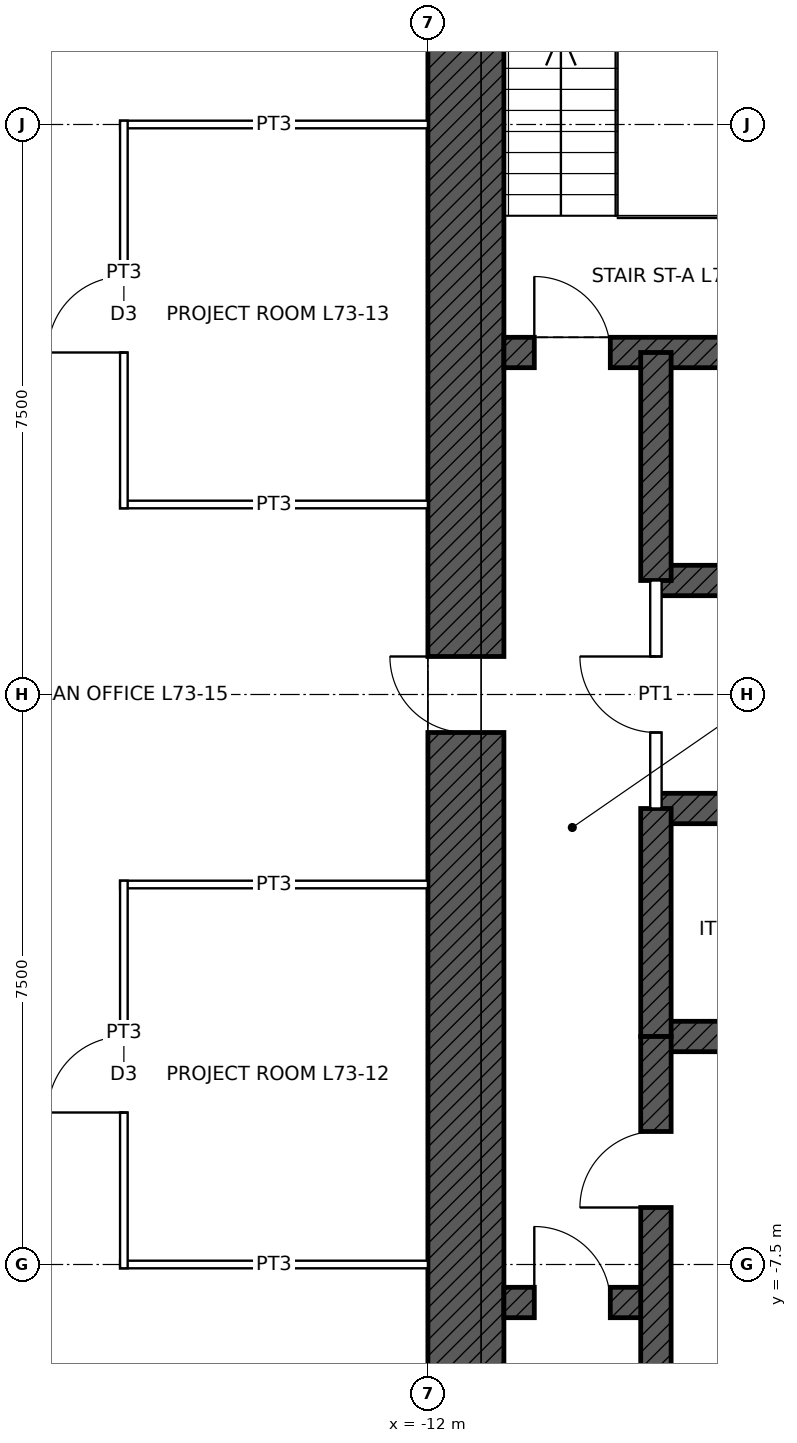
"""IFC4 building model, lengths in metres.
Left out: names, types, materials, properties, quantities, classifications, styles, units other than length and angle.
Written with IfcOpenShell. Run it as: python <this file> out.ifc"""

import sys

from ifc_helpers import new_model, si_unit, direction, frame, frame_2d, origin, place, context, subcontext, project, spatial, rectangle, extrude, element, fill, save


model = new_model("IFC4")
c1 = context("Model", 3, precision=1e-05, world=origin(), true_north=direction((0.0, 1.0)))
c2 = subcontext(c1, "Body", "Model", "MODEL_VIEW")
j1 = project(units=[si_unit("LENGTHUNIT", "METRE"), si_unit("PLANEANGLEUNIT", "RADIAN")], contexts=[c1])
p1 = place(None, origin())
s1 = spatial("IfcSite", under=j1, at=p1, CompositionType="ELEMENT")
p2 = place(p1, origin())
s2 = spatial("IfcBuilding", under=s1, at=p2, CompositionType="ELEMENT")
p3 = place(p2, frame((0.0, 0.0, 327.9)))
s3 = spatial("IfcBuildingStorey", under=s2, at=p3, CompositionType="ELEMENT", Elevation=327.9)
p4 = place(p3, frame((-11.5, -11.0, 0.0), z_axis=(0.0, 0.0, 1.0), x_axis=(0.0, 1.0, 0.0)))
e1 = element("IfcWall", 1, at=p4, inside=s3, PredefinedType="SHEAR", context=c2, shape_type="SweptSolid", body=[
    extrude(rectangle(XDim=22.0, YDim=1.0, at=frame_2d((11.0, 0.0))), origin(), (0.0, 0.0, 1.0), 4.0),
])
p5 = place(p4, frame((10.5, 0.0, 0.0)))
e2 = element("IfcOpeningElement", 2, at=p5, cuts=e1, PredefinedType="OPENING", context=c2, shape_type="SweptSolid", body=[
    extrude(rectangle(XDim=1.0, YDim=2.4, at=frame_2d((0.5, 1.2))), frame((0.0, 0.51, 0.0), z_axis=(0.0, -1.0, 0.0), x_axis=(1.0, 0.0, 0.0)), (0.0, 0.0, 1.0), 1.02),
])
p6 = place(p3, frame((-11.0, 4.5, 0.0), z_axis=(0.0, 0.0, 1.0), x_axis=(1.0, 0.0, 0.0)))
e3 = element("IfcWall", 3, at=p6, inside=s3, PredefinedType="SHEAR", context=c2, shape_type="SweptSolid", body=[
    extrude(rectangle(XDim=22.0, YDim=0.4, at=frame_2d((11.0, 0.0))), origin(), (0.0, 0.0, 1.0), 4.0),
])
p7 = place(p6, frame((0.4, 0.0, 0.0)))
e4 = element("IfcOpeningElement", 4, at=p7, cuts=e3, PredefinedType="OPENING", context=c2, shape_type="SweptSolid", body=[
    extrude(rectangle(XDim=1.0, YDim=2.1, at=frame_2d((0.5, 1.05))), frame((0.0, 0.21, 0.0), z_axis=(0.0, -1.0, 0.0), x_axis=(1.0, 0.0, 0.0)), (0.0, 0.0, 1.0), 0.42),
])
p8 = place(p6, frame((20.6, 0.0, 0.0)))
e5 = element("IfcOpeningElement", 5, at=p8, cuts=e3, PredefinedType="OPENING", context=c2, shape_type="SweptSolid", body=[
    extrude(rectangle(XDim=1.0, YDim=2.1, at=frame_2d((0.5, 1.05))), frame((0.0, 0.21, 0.0), z_axis=(0.0, -1.0, 0.0), x_axis=(1.0, 0.0, 0.0)), (0.0, 0.0, 1.0), 0.42),
])
p9 = place(p3, frame((-9.0, 1.5, 0.0), z_axis=(0.0, 0.0, 1.0), x_axis=(1.0, 0.0, 0.0)))
e6 = element("IfcWall", 6, at=p9, inside=s3, PredefinedType="SHEAR", context=c2, shape_type="SweptSolid", body=[
    extrude(rectangle(XDim=18.0, YDim=0.4, at=frame_2d((9.0, 0.0))), origin(), (0.0, 0.0, 1.0), 4.0),
])
p10 = place(p9, frame((0.95, 0.0, 0.0)))
e7 = element("IfcOpeningElement", 7, at=p10, cuts=e6, PredefinedType="OPENING", context=c2, shape_type="SweptSolid", body=[
    extrude(rectangle(XDim=1.1, YDim=2.1, at=frame_2d((0.55, 1.05))), frame((0.0, 0.21, 0.0), z_axis=(0.0, -1.0, 0.0), x_axis=(1.0, 0.0, 0.0)), (0.0, 0.0, 1.0), 0.42),
])
p11 = place(p9, frame((3.95, 0.0, 0.0)))
e8 = element("IfcOpeningElement", 8, at=p11, cuts=e6, PredefinedType="OPENING", context=c2, shape_type="SweptSolid", body=[
    extrude(rectangle(XDim=1.1, YDim=2.1, at=frame_2d((0.55, 1.05))), frame((0.0, 0.21, 0.0), z_axis=(0.0, -1.0, 0.0), x_axis=(1.0, 0.0, 0.0)), (0.0, 0.0, 1.0), 0.42),
])
p12 = place(p9, frame((6.95, 0.0, 0.0)))
e9 = element("IfcOpeningElement", 9, at=p12, cuts=e6, PredefinedType="OPENING", context=c2, shape_type="SweptSolid", body=[
    extrude(rectangle(XDim=1.1, YDim=2.1, at=frame_2d((0.55, 1.05))), frame((0.0, 0.21, 0.0), z_axis=(0.0, -1.0, 0.0), x_axis=(1.0, 0.0, 0.0)), (0.0, 0.0, 1.0), 0.42),
])
p13 = place(p9, frame((9.95, 0.0, 0.0)))
e10 = element("IfcOpeningElement", 10, at=p13, cuts=e6, PredefinedType="OPENING", context=c2, shape_type="SweptSolid", body=[
    extrude(rectangle(XDim=1.1, YDim=2.1, at=frame_2d((0.55, 1.05))), frame((0.0, 0.21, 0.0), z_axis=(0.0, -1.0, 0.0), x_axis=(1.0, 0.0, 0.0)), (0.0, 0.0, 1.0), 0.42),
])
p14 = place(p9, frame((12.95, 0.0, 0.0)))
e11 = element("IfcOpeningElement", 11, at=p14, cuts=e6, PredefinedType="OPENING", context=c2, shape_type="SweptSolid", body=[
    extrude(rectangle(XDim=1.1, YDim=2.1, at=frame_2d((0.55, 1.05))), frame((0.0, 0.21, 0.0), z_axis=(0.0, -1.0, 0.0), x_axis=(1.0, 0.0, 0.0)), (0.0, 0.0, 1.0), 0.42),
])
p15 = place(p9, frame((15.95, 0.0, 0.0)))
e12 = element("IfcOpeningElement", 12, at=p15, cuts=e6, PredefinedType="OPENING", context=c2, shape_type="SweptSolid", body=[
    extrude(rectangle(XDim=1.1, YDim=2.1, at=frame_2d((0.55, 1.05))), frame((0.0, 0.21, 0.0), z_axis=(0.0, -1.0, 0.0), x_axis=(1.0, 0.0, 0.0)), (0.0, 0.0, 1.0), 0.42),
])
p16 = place(p3, frame((-9.0, -1.5, 0.0), z_axis=(0.0, 0.0, 1.0), x_axis=(1.0, 0.0, 0.0)))
e13 = element("IfcWall", 13, at=p16, inside=s3, PredefinedType="SHEAR", context=c2, shape_type="SweptSolid", body=[
    extrude(rectangle(XDim=18.0, YDim=0.4, at=frame_2d((9.0, 0.0))), origin(), (0.0, 0.0, 1.0), 4.0),
])
p17 = place(p16, frame((9.95, 0.0, 0.0)))
e14 = element("IfcOpeningElement", 14, at=p17, cuts=e13, PredefinedType="OPENING", context=c2, shape_type="SweptSolid", body=[
    extrude(rectangle(XDim=1.1, YDim=2.1, at=frame_2d((0.55, 1.05))), frame((0.0, 0.21, 0.0), z_axis=(0.0, -1.0, 0.0), x_axis=(1.0, 0.0, 0.0)), (0.0, 0.0, 1.0), 0.42),
])
p18 = place(p16, frame((12.95, 0.0, 0.0)))
e15 = element("IfcOpeningElement", 15, at=p18, cuts=e13, PredefinedType="OPENING", context=c2, shape_type="SweptSolid", body=[
    extrude(rectangle(XDim=1.1, YDim=2.1, at=frame_2d((0.55, 1.05))), frame((0.0, 0.21, 0.0), z_axis=(0.0, -1.0, 0.0), x_axis=(1.0, 0.0, 0.0)), (0.0, 0.0, 1.0), 0.42),
])
p19 = place(p16, frame((15.95, 0.0, 0.0)))
e16 = element("IfcOpeningElement", 16, at=p19, cuts=e13, PredefinedType="OPENING", context=c2, shape_type="SweptSolid", body=[
    extrude(rectangle(XDim=1.1, YDim=2.1, at=frame_2d((0.55, 1.05))), frame((0.0, 0.21, 0.0), z_axis=(0.0, -1.0, 0.0), x_axis=(1.0, 0.0, 0.0)), (0.0, 0.0, 1.0), 0.42),
])
p20 = place(p16, frame((0.95, 0.0, 0.0)))
e17 = element("IfcOpeningElement", 17, at=p20, cuts=e13, PredefinedType="OPENING", context=c2, shape_type="SweptSolid", body=[
    extrude(rectangle(XDim=1.1, YDim=2.1, at=frame_2d((0.55, 1.05))), frame((0.0, 0.21, 0.0), z_axis=(0.0, -1.0, 0.0), x_axis=(1.0, 0.0, 0.0)), (0.0, 0.0, 1.0), 0.42),
])
p21 = place(p16, frame((3.95, 0.0, 0.0)))
e18 = element("IfcOpeningElement", 18, at=p21, cuts=e13, PredefinedType="OPENING", context=c2, shape_type="SweptSolid", body=[
    extrude(rectangle(XDim=1.1, YDim=2.1, at=frame_2d((0.55, 1.05))), frame((0.0, 0.21, 0.0), z_axis=(0.0, -1.0, 0.0), x_axis=(1.0, 0.0, 0.0)), (0.0, 0.0, 1.0), 0.42),
])
p22 = place(p16, frame((6.95, 0.0, 0.0)))
e19 = element("IfcOpeningElement", 19, at=p22, cuts=e13, PredefinedType="OPENING", context=c2, shape_type="SweptSolid", body=[
    extrude(rectangle(XDim=1.1, YDim=2.1, at=frame_2d((0.55, 1.05))), frame((0.0, 0.21, 0.0), z_axis=(0.0, -1.0, 0.0), x_axis=(1.0, 0.0, 0.0)), (0.0, 0.0, 1.0), 0.42),
])
p23 = place(p3, frame((-9.0, -4.5, 0.0), z_axis=(0.0, 0.0, 1.0), x_axis=(1.0, 0.0, 0.0)))
e20 = element("IfcWall", 20, at=p23, inside=s3, PredefinedType="SHEAR", context=c2, shape_type="SweptSolid", body=[
    extrude(rectangle(XDim=18.0, YDim=0.4, at=frame_2d((9.0, 0.0))), origin(), (0.0, 0.0, 1.0), 4.0),
])
p24 = place(p3, frame((-11.0, -8.0, 0.0), z_axis=(0.0, 0.0, 1.0), x_axis=(1.0, 0.0, 0.0)))
e21 = element("IfcWall", 21, at=p24, inside=s3, PredefinedType="SHEAR", context=c2, shape_type="SweptSolid", body=[
    extrude(rectangle(XDim=2.0, YDim=0.4, at=frame_2d((1.0, 0.0))), origin(), (0.0, 0.0, 1.0), 4.0),
])
p25 = place(p24, frame((0.4, 0.0, 0.0)))
e22 = element("IfcOpeningElement", 22, at=p25, cuts=e21, PredefinedType="OPENING", context=c2, shape_type="SweptSolid", body=[
    extrude(rectangle(XDim=1.0, YDim=2.1, at=frame_2d((0.5, 1.05))), frame((0.0, 0.21, 0.0), z_axis=(0.0, -1.0, 0.0), x_axis=(1.0, 0.0, 0.0)), (0.0, 0.0, 1.0), 0.42),
])
for number, where, z_axis, x_axis in (
    (23, (-9.0, 1.5, 0.0), (0.0, 0.0, 1.0), (0.0, 1.0, 0.0)),
    (24, (-9.0, -4.5, 0.0), (0.0, 0.0, 1.0), (0.0, 1.0, 0.0)),
):
    element("IfcWall", number, at=place(p3, frame(where, z_axis=z_axis, x_axis=x_axis)), inside=s3, PredefinedType="SHEAR", context=c2, shape_type="SweptSolid", body=[
        extrude(rectangle(XDim=3.0, YDim=0.4, at=frame_2d((1.5, 0.0))), origin(), (0.0, 0.0, 1.0), 4.0),
    ])
p26 = place(p3, frame((-9.0, -11.0, 0.0), z_axis=(0.0, 0.0, 1.0), x_axis=(0.0, 1.0, 0.0)))
e25 = element("IfcWall", 25, at=p26, inside=s3, PredefinedType="SHEAR", context=c2, shape_type="SweptSolid", body=[
    extrude(rectangle(XDim=6.5, YDim=0.4, at=frame_2d((3.25, 0.0))), origin(), (0.0, 0.0, 1.0), 4.0),
])
p27 = place(p26, frame((4.25, 0.0, 0.0)))
e26 = element("IfcOpeningElement", 26, at=p27, cuts=e25, PredefinedType="OPENING", context=c2, shape_type="SweptSolid", body=[
    extrude(rectangle(XDim=1.0, YDim=2.1, at=frame_2d((0.5, 1.05))), frame((0.0, 0.21, 0.0), z_axis=(0.0, -1.0, 0.0), x_axis=(1.0, 0.0, 0.0)), (0.0, 0.0, 1.0), 0.42),
])
p28 = place(p3, frame((-16.05, -7.5, 0.0), z_axis=(0.0, 0.0, 1.0), x_axis=(1.0, 0.0, 0.0)))
e27 = element("IfcWall", 27, at=p28, inside=s3, PredefinedType="PARTITIONING", context=c2, shape_type="SweptSolid", body=[
    extrude(rectangle(XDim=4.05, YDim=0.1, at=frame_2d((2.025, 0.0))), origin(), (0.0, 0.0, 1.0), 3.243),
])
for number, where, z_axis, x_axis in (
    (28, (-16.05, -2.5, 0.0), (0.0, 0.0, 1.0), (1.0, 0.0, 0.0)),
    (29, (-16.05, 2.5, 0.0), (0.0, 0.0, 1.0), (1.0, 0.0, 0.0)),
):
    element("IfcWall", number, at=place(p3, frame(where, z_axis=z_axis, x_axis=x_axis)), inside=s3, PredefinedType="PARTITIONING", context=c2, shape_type="SweptSolid", body=[
        extrude(rectangle(XDim=4.05, YDim=0.1, at=frame_2d((2.025, 0.0))), origin(), (0.0, 0.0, 1.0), 3.85),
    ])
p29 = place(p3, frame((-16.05, 7.5, 0.0), z_axis=(0.0, 0.0, 1.0), x_axis=(1.0, 0.0, 0.0)))
e30 = element("IfcWall", 30, at=p29, inside=s3, PredefinedType="PARTITIONING", context=c2, shape_type="SweptSolid", body=[
    extrude(rectangle(XDim=4.05, YDim=0.1, at=frame_2d((2.025, 0.0))), origin(), (0.0, 0.0, 1.0), 3.243),
])
p30 = place(p3, frame((-16.0, -7.55, 0.0), z_axis=(0.0, 0.0, 1.0), x_axis=(0.0, 1.0, 0.0)))
e31 = element("IfcWall", 31, at=p30, inside=s3, PredefinedType="PARTITIONING", context=c2, shape_type="SweptSolid", body=[
    extrude(rectangle(XDim=5.1, YDim=0.1, at=frame_2d((2.55, 0.0))), origin(), (0.0, 0.0, 1.0), 3.85),
])
p31 = place(p30, frame((2.05, 0.0, 0.0)))
e32 = element("IfcOpeningElement", 32, at=p31, cuts=e31, PredefinedType="OPENING", context=c2, shape_type="SweptSolid", body=[
    extrude(rectangle(XDim=1.0, YDim=2.1, at=frame_2d((0.5, 1.05))), frame((0.0, 0.06, 0.0), z_axis=(0.0, -1.0, 0.0), x_axis=(1.0, 0.0, 0.0)), (0.0, 0.0, 1.0), 0.12),
])
p32 = place(p3, frame((-16.0, 2.45, 0.0), z_axis=(0.0, 0.0, 1.0), x_axis=(0.0, 1.0, 0.0)))
e33 = element("IfcWall", 33, at=p32, inside=s3, PredefinedType="PARTITIONING", context=c2, shape_type="SweptSolid", body=[
    extrude(rectangle(XDim=5.1, YDim=0.1, at=frame_2d((2.55, 0.0))), origin(), (0.0, 0.0, 1.0), 3.85),
])
p33 = place(p32, frame((2.05, 0.0, 0.0)))
e34 = element("IfcOpeningElement", 34, at=p33, cuts=e33, PredefinedType="OPENING", context=c2, shape_type="SweptSolid", body=[
    extrude(rectangle(XDim=1.0, YDim=2.1, at=frame_2d((0.5, 1.05))), frame((0.0, 0.06, 0.0), z_axis=(0.0, -1.0, 0.0), x_axis=(1.0, 0.0, 0.0)), (0.0, 0.0, 1.0), 0.12),
])
p34 = place(p3, frame((-9.0, -1.5, 0.0), z_axis=(0.0, 0.0, 1.0), x_axis=(0.0, 1.0, 0.0)))
e35 = element("IfcWall", 35, at=p34, inside=s3, PredefinedType="PARTITIONING", context=c2, shape_type="SweptSolid", body=[
    extrude(rectangle(XDim=3.0, YDim=0.15, at=frame_2d((1.5, 0.0))), origin(), (0.0, 0.0, 1.0), 3.75),
])
p35 = place(p34, frame((1.0, 0.0, 0.0)))
e36 = element("IfcOpeningElement", 36, at=p35, cuts=e35, PredefinedType="OPENING", context=c2, shape_type="SweptSolid", body=[
    extrude(rectangle(XDim=1.0, YDim=2.4, at=frame_2d((0.5, 1.2))), frame((0.0, 0.085, 0.0), z_axis=(0.0, -1.0, 0.0), x_axis=(1.0, 0.0, 0.0)), (0.0, 0.0, 1.0), 0.17),
])
p36 = place(p7, origin())
e37 = element("IfcDoor", 37, at=p36, inside=s3, OperationType="SINGLE_SWING_LEFT", PredefinedType="DOOR", context=c2, shape_type="SweptSolid", body=[
    extrude(rectangle(XDim=1.0, YDim=2.1, at=frame_2d((0.5, 1.05))), frame((0.0, 0.025, 0.0), z_axis=(0.0, -1.0, 0.0), x_axis=(1.0, 0.0, 0.0)), (0.0, 0.0, 1.0), 0.05),
])
fill(e4, e37)
p37 = place(p5, origin())
e38 = element("IfcDoor", 38, at=p37, inside=s3, OperationType="SINGLE_SWING_RIGHT", PredefinedType="DOOR", context=c2, shape_type="SweptSolid", body=[
    extrude(rectangle(XDim=1.0, YDim=2.4, at=frame_2d((0.5, 1.2))), frame((0.0, 0.485, 0.0), z_axis=(0.0, -1.0, 0.0), x_axis=(1.0, 0.0, 0.0)), (0.0, 0.0, 1.0), 0.05),
])
fill(e2, e38)
p38 = place(p27, origin())
e39 = element("IfcDoor", 39, at=p38, inside=s3, OperationType="SINGLE_SWING_LEFT", PredefinedType="DOOR", context=c2, shape_type="SweptSolid", body=[
    extrude(rectangle(XDim=1.0, YDim=2.1, at=frame_2d((0.5, 1.05))), frame((0.0, 0.025, 0.0), z_axis=(0.0, -1.0, 0.0), x_axis=(1.0, 0.0, 0.0)), (0.0, 0.0, 1.0), 0.05),
])
fill(e26, e39)
p39 = place(p25, origin())
e40 = element("IfcDoor", 40, at=p39, inside=s3, OperationType="SINGLE_SWING_LEFT", PredefinedType="DOOR", context=c2, shape_type="SweptSolid", body=[
    extrude(rectangle(XDim=1.0, YDim=2.1, at=frame_2d((0.5, 1.05))), frame((0.0, 0.025, 0.0), z_axis=(0.0, -1.0, 0.0), x_axis=(1.0, 0.0, 0.0)), (0.0, 0.0, 1.0), 0.05),
])
fill(e22, e40)
p40 = place(p35, origin())
e41 = element("IfcDoor", 41, at=p40, inside=s3, OperationType="SINGLE_SWING_RIGHT", PredefinedType="DOOR", context=c2, shape_type="SweptSolid", body=[
    extrude(rectangle(XDim=1.0, YDim=2.4, at=frame_2d((0.5, 1.2))), frame((0.0, 0.025, 0.0), z_axis=(0.0, -1.0, 0.0), x_axis=(1.0, 0.0, 0.0)), (0.0, 0.0, 1.0), 0.05),
])
fill(e36, e41)
p41 = place(p31, origin())
e42 = element("IfcDoor", 42, at=p41, inside=s3, OperationType="SINGLE_SWING_LEFT", PredefinedType="DOOR", context=c2, shape_type="SweptSolid", body=[
    extrude(rectangle(XDim=1.0, YDim=2.1, at=frame_2d((0.5, 1.05))), frame((0.0, 0.025, 0.0), z_axis=(0.0, -1.0, 0.0), x_axis=(1.0, 0.0, 0.0)), (0.0, 0.0, 1.0), 0.05),
])
fill(e32, e42)
p42 = place(p33, origin())
e43 = element("IfcDoor", 43, at=p42, inside=s3, OperationType="SINGLE_SWING_LEFT", PredefinedType="DOOR", context=c2, shape_type="SweptSolid", body=[
    extrude(rectangle(XDim=1.0, YDim=2.1, at=frame_2d((0.5, 1.05))), frame((0.0, 0.025, 0.0), z_axis=(0.0, -1.0, 0.0), x_axis=(1.0, 0.0, 0.0)), (0.0, 0.0, 1.0), 0.05),
])
fill(e34, e43)
save(model, sys.argv[1])
